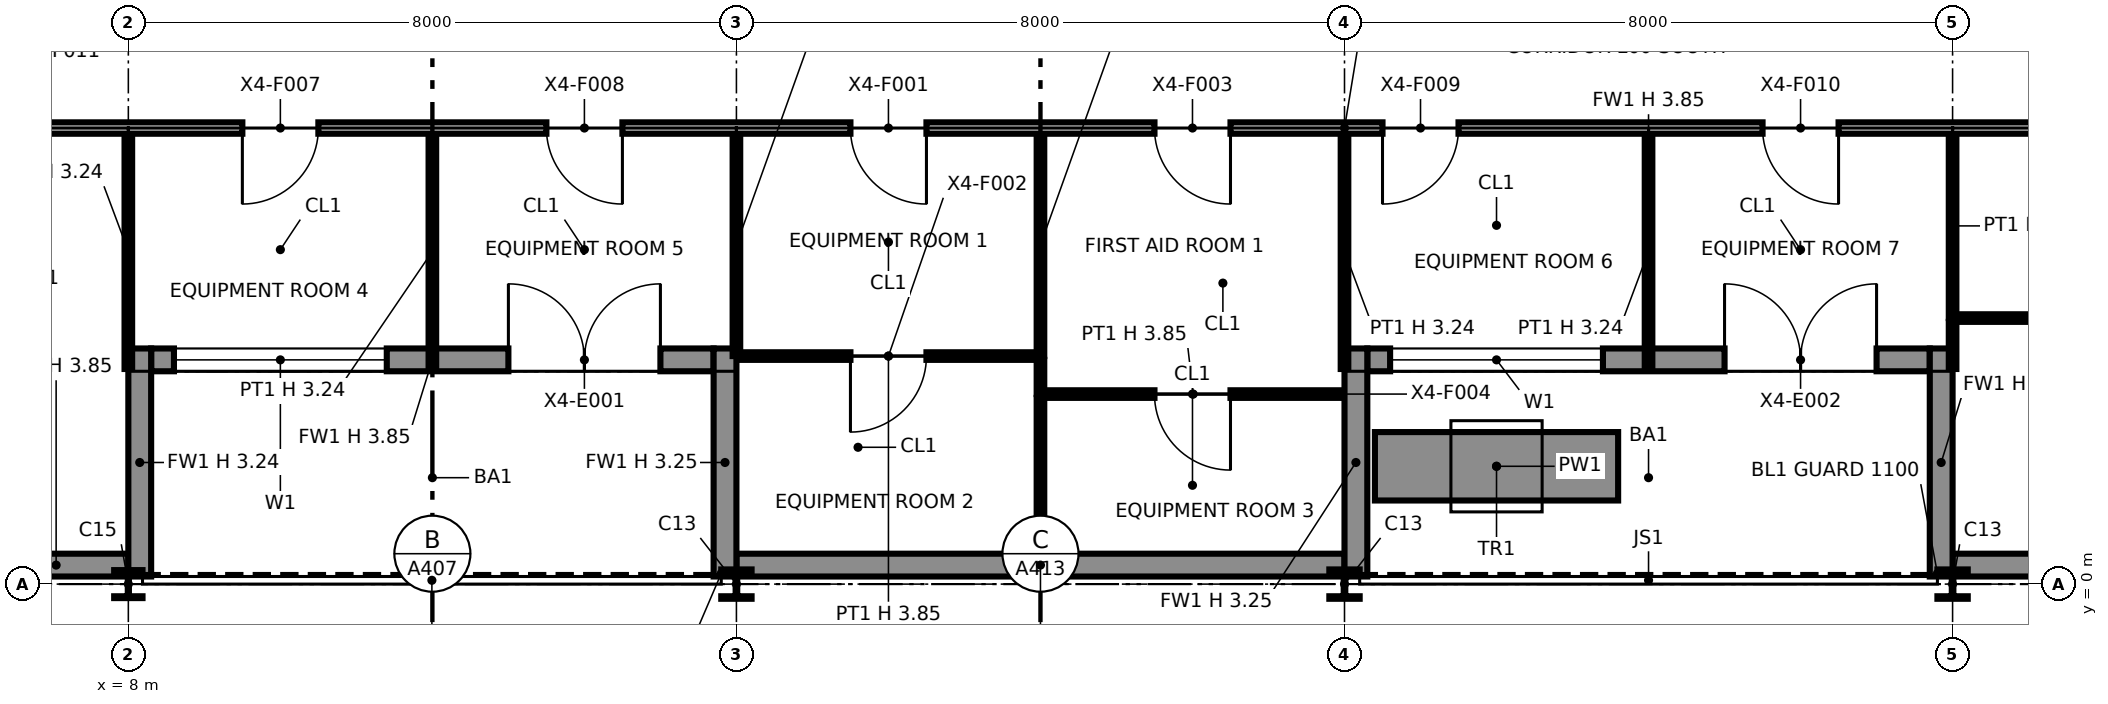
"""IFC4 building model, lengths in metres.
Left out: names, types, materials, properties, quantities, classifications, styles, units other than length and angle.
Written with IfcOpenShell. Run it as: python <this file> out.ifc"""

import sys

from ifc_helpers import new_model, si_unit, direction, frame, frame_2d, origin, origin_2d, place, context, subcontext, project, spatial, rectangle, i_section, extrude, element, fill, save


model = new_model("IFC4")
c1 = context("Model", 3, precision=1e-05, world=origin(), true_north=direction((0.0, 1.0)))
c2 = subcontext(c1, "Body", "Model", "MODEL_VIEW")
j1 = project(units=[si_unit("LENGTHUNIT", "METRE"), si_unit("PLANEANGLEUNIT", "RADIAN")], contexts=[c1])
p1 = place(None, origin())
s1 = spatial("IfcSite", under=j1, at=p1, CompositionType="ELEMENT")
p2 = place(p1, origin())
s2 = spatial("IfcBuilding", under=s1, at=p2, CompositionType="ELEMENT")
p3 = place(p2, frame((0.0, 0.0, 275.0)))
s3 = spatial("IfcBuildingStorey", under=s2, at=p3, CompositionType="ELEMENT", Elevation=275.0)
p4 = place(p3, frame((8.0, 0.0, 0.0), z_axis=(0.0, 0.0, 1.0), x_axis=(1.0, 0.0, 0.0)))
e1 = element("IfcColumn", 1, at=p4, inside=s3, PredefinedType="COLUMN", context=c2, shape_type="SweptSolid", body=[
    extrude(i_section(OverallWidth=0.373, OverallDepth=0.368, WebThickness=0.015, FlangeThickness=0.024, at=origin_2d()), origin(), (0.0, 0.0, 1.0), 3.85),
])
for number, where, z_axis, x_axis in (
    (2, (16.0, 0.0, 0.0), (0.0, 0.0, 1.0), (1.0, 0.0, 0.0)),
    (3, (24.0, 0.0, 0.0), (0.0, 0.0, 1.0), (1.0, 0.0, 0.0)),
    (4, (32.0, 0.0, 0.0), (0.0, 0.0, 1.0), (1.0, 0.0, 0.0)),
):
    element("IfcColumn", number, at=place(p3, frame(where, z_axis=z_axis, x_axis=x_axis)), inside=s3, PredefinedType="COLUMN", context=c2, shape_type="SweptSolid", body=[
        extrude(i_section(OverallWidth=0.399, OverallDepth=0.386, WebThickness=0.021, FlangeThickness=0.033, at=origin_2d()), origin(), (0.0, 0.0, 1.0), 3.85),
    ])
p5 = place(p3, frame((6.1, 0.25, 0.0), z_axis=(0.0, 0.0, 1.0), x_axis=(1.0, 0.0, 0.0)))
e5 = element("IfcWall", 5, at=p5, inside=s3, PredefinedType="SOLIDWALL", context=c2, shape_type="SweptSolid", body=[
    extrude(rectangle(XDim=1.9, YDim=0.3, at=frame_2d((0.95, 0.0))), origin(), (0.0, 0.0, 1.0), 3.85),
])
p6 = place(p3, frame((8.3, 2.95, 0.0), z_axis=(0.0, 0.0, 1.0), x_axis=(1.0, 0.0, 0.0)))
e6 = element("IfcWall", 6, at=p6, inside=s3, PredefinedType="SOLIDWALL", context=c2, shape_type="SweptSolid", body=[
    extrude(rectangle(XDim=7.4, YDim=0.3, at=frame_2d((3.7, 0.0))), origin(), (0.0, 0.0, 1.0), 3.85),
])
p7 = place(p6, frame((0.3, 0.0, 0.9)))
e7 = element("IfcOpeningElement", 7, at=p7, cuts=e6, PredefinedType="OPENING", context=c2, shape_type="SweptSolid", body=[
    extrude(rectangle(XDim=2.8, YDim=2.2, at=frame_2d((1.4, 1.1))), frame((0.0, 0.16, 0.0), z_axis=(0.0, -1.0, 0.0), x_axis=(1.0, 0.0, 0.0)), (0.0, 0.0, 1.0), 0.32),
])
p8 = place(p6, frame((4.7, 0.0, 0.0)))
e8 = element("IfcOpeningElement", 8, at=p8, cuts=e6, PredefinedType="OPENING", context=c2, shape_type="SweptSolid", body=[
    extrude(rectangle(XDim=2.0, YDim=2.4, at=frame_2d((1.0, 1.2))), frame((0.0, 0.16, 0.0), z_axis=(0.0, -1.0, 0.0), x_axis=(1.0, 0.0, 0.0)), (0.0, 0.0, 1.0), 0.32),
])
p9 = place(p3, frame((8.15, 0.1, 0.0), z_axis=(0.0, 0.0, 1.0), x_axis=(0.0, 1.0, 0.0)))
e9 = element("IfcWall", 9, at=p9, inside=s3, PredefinedType="SOLIDWALL", context=c2, shape_type="SweptSolid", body=[
    extrude(rectangle(XDim=3.0, YDim=0.3, at=frame_2d((1.5, 0.0))), origin(), (0.0, 0.0, 1.0), 3.237),
])
p10 = place(p3, frame((15.85, 0.1, 0.0), z_axis=(0.0, 0.0, 1.0), x_axis=(0.0, 1.0, 0.0)))
e10 = element("IfcWall", 10, at=p10, inside=s3, PredefinedType="SOLIDWALL", context=c2, shape_type="SweptSolid", body=[
    extrude(rectangle(XDim=3.0, YDim=0.3, at=frame_2d((1.5, 0.0))), origin(), (0.0, 0.0, 1.0), 3.247),
])
p11 = place(p3, frame((16.0, 0.25, 0.0), z_axis=(0.0, 0.0, 1.0), x_axis=(1.0, 0.0, 0.0)))
e11 = element("IfcWall", 11, at=p11, inside=s3, PredefinedType="SOLIDWALL", context=c2, shape_type="SweptSolid", body=[
    extrude(rectangle(XDim=8.0, YDim=0.3, at=frame_2d((4.0, 0.0))), origin(), (0.0, 0.0, 1.0), 3.85),
])
p12 = place(p3, frame((24.3, 2.95, 0.0), z_axis=(0.0, 0.0, 1.0), x_axis=(1.0, 0.0, 0.0)))
e12 = element("IfcWall", 12, at=p12, inside=s3, PredefinedType="SOLIDWALL", context=c2, shape_type="SweptSolid", body=[
    extrude(rectangle(XDim=7.4, YDim=0.3, at=frame_2d((3.7, 0.0))), origin(), (0.0, 0.0, 1.0), 3.85),
])
p13 = place(p12, frame((0.3, 0.0, 0.9)))
e13 = element("IfcOpeningElement", 13, at=p13, cuts=e12, PredefinedType="OPENING", context=c2, shape_type="SweptSolid", body=[
    extrude(rectangle(XDim=2.8, YDim=2.2, at=frame_2d((1.4, 1.1))), frame((0.0, 0.16, 0.0), z_axis=(0.0, -1.0, 0.0), x_axis=(1.0, 0.0, 0.0)), (0.0, 0.0, 1.0), 0.32),
])
p14 = place(p12, frame((4.7, 0.0, 0.0)))
e14 = element("IfcOpeningElement", 14, at=p14, cuts=e12, PredefinedType="OPENING", context=c2, shape_type="SweptSolid", body=[
    extrude(rectangle(XDim=2.0, YDim=2.4, at=frame_2d((1.0, 1.2))), frame((0.0, 0.16, 0.0), z_axis=(0.0, -1.0, 0.0), x_axis=(1.0, 0.0, 0.0)), (0.0, 0.0, 1.0), 0.32),
])
for number, where, z_axis, x_axis in (
    (15, (24.15, 0.1, 0.0), (0.0, 0.0, 1.0), (0.0, 1.0, 0.0)),
    (16, (31.85, 0.1, 0.0), (0.0, 0.0, 1.0), (0.0, 1.0, 0.0)),
):
    element("IfcWall", number, at=place(p3, frame(where, z_axis=z_axis, x_axis=x_axis)), inside=s3, PredefinedType="SOLIDWALL", context=c2, shape_type="SweptSolid", body=[
        extrude(rectangle(XDim=3.0, YDim=0.3, at=frame_2d((1.5, 0.0))), origin(), (0.0, 0.0, 1.0), 3.247),
    ])
p15 = place(p3, frame((32.0, 0.25, 0.0), z_axis=(0.0, 0.0, 1.0), x_axis=(1.0, 0.0, 0.0)))
e17 = element("IfcWall", 17, at=p15, inside=s3, PredefinedType="SOLIDWALL", context=c2, shape_type="SweptSolid", body=[
    extrude(rectangle(XDim=9.9, YDim=0.3, at=frame_2d((4.95, 0.0))), origin(), (0.0, 0.0, 1.0), 3.85),
])
p16 = place(p3, frame((24.4, 1.55, 0.0), z_axis=(0.0, 0.0, 1.0), x_axis=(1.0, 0.0, 0.0)))
e18 = element("IfcWall", 18, at=p16, inside=s3, PredefinedType="SOLIDWALL", context=c2, shape_type="SweptSolid", body=[
    extrude(rectangle(XDim=3.2, YDim=0.9, at=frame_2d((1.6, 0.0))), origin(), (0.0, 0.0, 1.0), 0.6),
])
p17 = place(p3, frame((20.0, 0.13, 0.0), z_axis=(0.0, 0.0, 1.0), x_axis=(0.0, 1.0, 0.0)))
e19 = element("IfcWall", 19, at=p17, inside=s3, PredefinedType="PARTITIONING", context=c2, shape_type="SweptSolid", body=[
    extrude(rectangle(XDim=2.32, YDim=0.1, at=frame_2d((1.16, 0.0))), origin(), (0.0, 0.0, 1.0), 3.85),
])
p18 = place(p3, frame((20.05, 2.5, 0.0), z_axis=(0.0, 0.0, 1.0), x_axis=(1.0, 0.0, 0.0)))
e20 = element("IfcWall", 20, at=p18, inside=s3, PredefinedType="PARTITIONING", context=c2, shape_type="SweptSolid", body=[
    extrude(rectangle(XDim=3.92, YDim=0.1, at=frame_2d((1.96, 0.0))), origin(), (0.0, 0.0, 1.0), 3.85),
])
p19 = place(p18, frame((2.45, 0.0, 0.0), z_axis=(0.0, 0.0, 1.0), x_axis=(-1.0, 0.0, 0.0)))
e21 = element("IfcOpeningElement", 21, at=p19, cuts=e20, PredefinedType="OPENING", context=c2, shape_type="SweptSolid", body=[
    extrude(rectangle(XDim=1.0, YDim=2.1, at=frame_2d((0.5, 1.05))), frame((0.0, 0.06, 0.0), z_axis=(0.0, -1.0, 0.0), x_axis=(1.0, 0.0, 0.0)), (0.0, 0.0, 1.0), 0.12),
])
p20 = place(p3, frame((20.0, 2.5, 0.0), z_axis=(0.0, 0.0, 1.0), x_axis=(0.0, 1.0, 0.0)))
e22 = element("IfcWall", 22, at=p20, inside=s3, PredefinedType="PARTITIONING", context=c2, shape_type="SweptSolid", body=[
    extrude(rectangle(XDim=0.45, YDim=0.1, at=frame_2d((0.225, 0.0))), origin(), (0.0, 0.0, 1.0), 3.85),
])
for number, where, z_axis, x_axis in (
    (23, (8.0, 2.83, 0.0), (0.0, 0.0, 1.0), (0.0, 1.0, 0.0)),
    (24, (12.0, 2.83, 0.0), (0.0, 0.0, 1.0), (0.0, 1.0, 0.0)),
    (25, (24.0, 2.83, 0.0), (0.0, 0.0, 1.0), (0.0, 1.0, 0.0)),
    (26, (28.0, 2.83, 0.0), (0.0, 0.0, 1.0), (0.0, 1.0, 0.0)),
):
    element("IfcWall", number, at=place(p3, frame(where, z_axis=z_axis, x_axis=x_axis)), inside=s3, PredefinedType="PARTITIONING", context=c2, shape_type="SweptSolid", body=[
        extrude(rectangle(XDim=3.095, YDim=0.1, at=frame_2d((1.547, 0.0))), origin(), (0.0, 0.0, 1.0), 3.238),
    ])
p21 = place(p3, frame((32.0, 2.83, 0.0), z_axis=(0.0, 0.0, 1.0), x_axis=(0.0, 1.0, 0.0)))
e27 = element("IfcWall", 27, at=p21, inside=s3, PredefinedType="PARTITIONING", context=c2, shape_type="SweptSolid", body=[
    extrude(rectangle(XDim=0.62, YDim=0.1, at=frame_2d((0.31, 0.0))), origin(), (0.0, 0.0, 1.0), 3.238),
])
p22 = place(p3, frame((16.05, 3.0, 0.0), z_axis=(0.0, 0.0, 1.0), x_axis=(1.0, 0.0, 0.0)))
e28 = element("IfcWall", 28, at=p22, inside=s3, PredefinedType="PARTITIONING", context=c2, shape_type="SweptSolid", body=[
    extrude(rectangle(XDim=3.9, YDim=0.1, at=frame_2d((1.95, 0.0))), origin(), (0.0, 0.0, 1.0), 3.85),
])
p23 = place(p22, frame((2.45, 0.0, 0.0), z_axis=(0.0, 0.0, 1.0), x_axis=(-1.0, 0.0, 0.0)))
e29 = element("IfcOpeningElement", 29, at=p23, cuts=e28, PredefinedType="OPENING", context=c2, shape_type="SweptSolid", body=[
    extrude(rectangle(XDim=1.0, YDim=2.1, at=frame_2d((0.5, 1.05))), frame((0.0, 0.06, 0.0), z_axis=(0.0, -1.0, 0.0), x_axis=(1.0, 0.0, 0.0)), (0.0, 0.0, 1.0), 0.12),
])
for number, where, z_axis, x_axis in (
    (30, (16.0, 3.0, 0.0), (0.0, 0.0, 1.0), (0.0, 1.0, 0.0)),
    (31, (20.0, 3.0, 0.0), (0.0, 0.0, 1.0), (0.0, 1.0, 0.0)),
):
    element("IfcWall", number, at=place(p3, frame(where, z_axis=z_axis, x_axis=x_axis)), inside=s3, PredefinedType="PARTITIONING", context=c2, shape_type="SweptSolid", body=[
        extrude(rectangle(XDim=2.925, YDim=0.1, at=frame_2d((1.462, 0.0))), origin(), (0.0, 0.0, 1.0), 3.238),
    ])
p24 = place(p3, frame((32.05, 3.5, 0.0), z_axis=(0.0, 0.0, 1.0), x_axis=(1.0, 0.0, 0.0)))
e32 = element("IfcWall", 32, at=p24, inside=s3, PredefinedType="PARTITIONING", context=c2, shape_type="SweptSolid", body=[
    extrude(rectangle(XDim=11.52, YDim=0.1, at=frame_2d((5.76, 0.0))), origin(), (0.0, 0.0, 1.0), 3.85),
])
p25 = place(p24, frame((5.4, 0.0, 0.0)))
e33 = element("IfcOpeningElement", 33, at=p25, cuts=e32, PredefinedType="OPENING", context=c2, shape_type="SweptSolid", body=[
    extrude(rectangle(XDim=1.0, YDim=2.1, at=frame_2d((0.5, 1.05))), frame((0.0, 0.06, 0.0), z_axis=(0.0, -1.0, 0.0), x_axis=(1.0, 0.0, 0.0)), (0.0, 0.0, 1.0), 0.12),
])
p26 = place(p3, frame((32.0, 3.5, 0.0), z_axis=(0.0, 0.0, 1.0), x_axis=(0.0, 1.0, 0.0)))
e34 = element("IfcWall", 34, at=p26, inside=s3, PredefinedType="PARTITIONING", context=c2, shape_type="SweptSolid", body=[
    extrude(rectangle(XDim=2.425, YDim=0.1, at=frame_2d((1.212, 0.0))), origin(), (0.0, 0.0, 1.0), 3.238),
])
p27 = place(p3, frame((6.075, 6.0, 0.0), z_axis=(0.0, 0.0, 1.0), x_axis=(1.0, 0.0, 0.0)))
e35 = element("IfcWall", 35, at=p27, inside=s3, PredefinedType="PARTITIONING", context=c2, shape_type="SweptSolid", body=[
    extrude(rectangle(XDim=35.85, YDim=0.15, at=frame_2d((17.925, 0.0))), origin(), (0.0, 0.0, 1.0), 3.85),
])
p28 = place(p27, frame((12.425, 0.0, 0.0), z_axis=(0.0, 0.0, 1.0), x_axis=(-1.0, 0.0, 0.0)))
e36 = element("IfcOpeningElement", 36, at=p28, cuts=e35, PredefinedType="OPENING", context=c2, shape_type="SweptSolid", body=[
    extrude(rectangle(XDim=1.0, YDim=2.1, at=frame_2d((0.5, 1.05))), frame((0.0, 0.085, 0.0), z_axis=(0.0, -1.0, 0.0), x_axis=(1.0, 0.0, 0.0)), (0.0, 0.0, 1.0), 0.17),
])
p29 = place(p27, frame((16.425, 0.0, 0.0), z_axis=(0.0, 0.0, 1.0), x_axis=(-1.0, 0.0, 0.0)))
e37 = element("IfcOpeningElement", 37, at=p29, cuts=e35, PredefinedType="OPENING", context=c2, shape_type="SweptSolid", body=[
    extrude(rectangle(XDim=1.0, YDim=2.1, at=frame_2d((0.5, 1.05))), frame((0.0, 0.085, 0.0), z_axis=(0.0, -1.0, 0.0), x_axis=(1.0, 0.0, 0.0)), (0.0, 0.0, 1.0), 0.17),
])
p30 = place(p27, frame((30.425, 0.0, 0.0), z_axis=(0.0, 0.0, 1.0), x_axis=(-1.0, 0.0, 0.0)))
e38 = element("IfcOpeningElement", 38, at=p30, cuts=e35, PredefinedType="OPENING", context=c2, shape_type="SweptSolid", body=[
    extrude(rectangle(XDim=1.0, YDim=2.1, at=frame_2d((0.5, 1.05))), frame((0.0, 0.085, 0.0), z_axis=(0.0, -1.0, 0.0), x_axis=(1.0, 0.0, 0.0)), (0.0, 0.0, 1.0), 0.17),
])
p31 = place(p27, frame((4.425, 0.0, 0.0), z_axis=(0.0, 0.0, 1.0), x_axis=(-1.0, 0.0, 0.0)))
e39 = element("IfcOpeningElement", 39, at=p31, cuts=e35, PredefinedType="OPENING", context=c2, shape_type="SweptSolid", body=[
    extrude(rectangle(XDim=1.0, YDim=2.1, at=frame_2d((0.5, 1.05))), frame((0.0, 0.085, 0.0), z_axis=(0.0, -1.0, 0.0), x_axis=(1.0, 0.0, 0.0)), (0.0, 0.0, 1.0), 0.17),
])
p32 = place(p27, frame((8.425, 0.0, 0.0), z_axis=(0.0, 0.0, 1.0), x_axis=(-1.0, 0.0, 0.0)))
e40 = element("IfcOpeningElement", 40, at=p32, cuts=e35, PredefinedType="OPENING", context=c2, shape_type="SweptSolid", body=[
    extrude(rectangle(XDim=1.0, YDim=2.1, at=frame_2d((0.5, 1.05))), frame((0.0, 0.085, 0.0), z_axis=(0.0, -1.0, 0.0), x_axis=(1.0, 0.0, 0.0)), (0.0, 0.0, 1.0), 0.17),
])
p33 = place(p27, frame((19.425, 0.0, 0.0), z_axis=(0.0, 0.0, 1.0), x_axis=(-1.0, 0.0, 0.0)))
e41 = element("IfcOpeningElement", 41, at=p33, cuts=e35, PredefinedType="OPENING", context=c2, shape_type="SweptSolid", body=[
    extrude(rectangle(XDim=1.0, YDim=2.1, at=frame_2d((0.5, 1.05))), frame((0.0, 0.085, 0.0), z_axis=(0.0, -1.0, 0.0), x_axis=(1.0, 0.0, 0.0)), (0.0, 0.0, 1.0), 0.17),
])
p34 = place(p27, frame((24.425, 0.0, 0.0), z_axis=(0.0, 0.0, 1.0), x_axis=(-1.0, 0.0, 0.0)))
e42 = element("IfcOpeningElement", 42, at=p34, cuts=e35, PredefinedType="OPENING", context=c2, shape_type="SweptSolid", body=[
    extrude(rectangle(XDim=1.0, YDim=2.1, at=frame_2d((0.5, 1.05))), frame((0.0, 0.085, 0.0), z_axis=(0.0, -1.0, 0.0), x_axis=(1.0, 0.0, 0.0)), (0.0, 0.0, 1.0), 0.17),
])
p35 = place(p7, origin())
e43 = element("IfcWindow", 43, at=p35, inside=s3, PartitioningType="SINGLE_PANEL", PredefinedType="WINDOW", context=c2, shape_type="SweptSolid", body=[
    extrude(rectangle(XDim=2.8, YDim=2.2, at=frame_2d((1.4, 1.1))), frame((0.0, 0.03, 0.0), z_axis=(0.0, -1.0, 0.0), x_axis=(1.0, 0.0, 0.0)), (0.0, 0.0, 1.0), 0.06),
])
fill(e7, e43)
p36 = place(p8, origin())
e44 = element("IfcDoor", 44, at=p36, inside=s3, OperationType="DOUBLE_DOOR_SINGLE_SWING", PredefinedType="DOOR", context=c2, shape_type="SweptSolid", body=[
    extrude(rectangle(XDim=2.0, YDim=2.4, at=frame_2d((1.0, 1.2))), frame((0.0, 0.025, 0.0), z_axis=(0.0, -1.0, 0.0), x_axis=(1.0, 0.0, 0.0)), (0.0, 0.0, 1.0), 0.05),
])
fill(e8, e44)
p37 = place(p13, origin())
e45 = element("IfcWindow", 45, at=p37, inside=s3, PartitioningType="SINGLE_PANEL", PredefinedType="WINDOW", context=c2, shape_type="SweptSolid", body=[
    extrude(rectangle(XDim=2.8, YDim=2.2, at=frame_2d((1.4, 1.1))), frame((0.0, 0.03, 0.0), z_axis=(0.0, -1.0, 0.0), x_axis=(1.0, 0.0, 0.0)), (0.0, 0.0, 1.0), 0.06),
])
fill(e13, e45)
p38 = place(p14, origin())
e46 = element("IfcDoor", 46, at=p38, inside=s3, OperationType="DOUBLE_DOOR_SINGLE_SWING", PredefinedType="DOOR", context=c2, shape_type="SweptSolid", body=[
    extrude(rectangle(XDim=2.0, YDim=2.4, at=frame_2d((1.0, 1.2))), frame((0.0, 0.025, 0.0), z_axis=(0.0, -1.0, 0.0), x_axis=(1.0, 0.0, 0.0)), (0.0, 0.0, 1.0), 0.05),
])
fill(e14, e46)
p39 = place(p28, origin())
e47 = element("IfcDoor", 47, at=p39, inside=s3, OperationType="SINGLE_SWING_LEFT", PredefinedType="DOOR", context=c2, shape_type="SweptSolid", body=[
    extrude(rectangle(XDim=1.0, YDim=2.1, at=frame_2d((0.5, 1.05))), frame((0.0, 0.025, 0.0), z_axis=(0.0, -1.0, 0.0), x_axis=(1.0, 0.0, 0.0)), (0.0, 0.0, 1.0), 0.05),
])
fill(e36, e47)
p40 = place(p23, origin())
e48 = element("IfcDoor", 48, at=p40, inside=s3, OperationType="SINGLE_SWING_RIGHT", PredefinedType="DOOR", context=c2, shape_type="SweptSolid", body=[
    extrude(rectangle(XDim=1.0, YDim=2.1, at=frame_2d((0.5, 1.05))), frame((0.0, 0.025, 0.0), z_axis=(0.0, -1.0, 0.0), x_axis=(1.0, 0.0, 0.0)), (0.0, 0.0, 1.0), 0.05),
])
fill(e29, e48)
p41 = place(p29, origin())
e49 = element("IfcDoor", 49, at=p41, inside=s3, OperationType="SINGLE_SWING_LEFT", PredefinedType="DOOR", context=c2, shape_type="SweptSolid", body=[
    extrude(rectangle(XDim=1.0, YDim=2.1, at=frame_2d((0.5, 1.05))), frame((0.0, 0.025, 0.0), z_axis=(0.0, -1.0, 0.0), x_axis=(1.0, 0.0, 0.0)), (0.0, 0.0, 1.0), 0.05),
])
fill(e37, e49)
p42 = place(p19, origin())
e50 = element("IfcDoor", 50, at=p42, inside=s3, OperationType="SINGLE_SWING_LEFT", PredefinedType="DOOR", context=c2, shape_type="SweptSolid", body=[
    extrude(rectangle(XDim=1.0, YDim=2.1, at=frame_2d((0.5, 1.05))), frame((0.0, 0.025, 0.0), z_axis=(0.0, -1.0, 0.0), x_axis=(1.0, 0.0, 0.0)), (0.0, 0.0, 1.0), 0.05),
])
fill(e21, e50)
p43 = place(p31, origin())
e51 = element("IfcDoor", 51, at=p43, inside=s3, OperationType="SINGLE_SWING_RIGHT", PredefinedType="DOOR", context=c2, shape_type="SweptSolid", body=[
    extrude(rectangle(XDim=1.0, YDim=2.1, at=frame_2d((0.5, 1.05))), frame((0.0, 0.025, 0.0), z_axis=(0.0, -1.0, 0.0), x_axis=(1.0, 0.0, 0.0)), (0.0, 0.0, 1.0), 0.05),
])
fill(e39, e51)
p44 = place(p32, origin())
e52 = element("IfcDoor", 52, at=p44, inside=s3, OperationType="SINGLE_SWING_LEFT", PredefinedType="DOOR", context=c2, shape_type="SweptSolid", body=[
    extrude(rectangle(XDim=1.0, YDim=2.1, at=frame_2d((0.5, 1.05))), frame((0.0, 0.025, 0.0), z_axis=(0.0, -1.0, 0.0), x_axis=(1.0, 0.0, 0.0)), (0.0, 0.0, 1.0), 0.05),
])
fill(e40, e52)
p45 = place(p33, origin())
e53 = element("IfcDoor", 53, at=p45, inside=s3, OperationType="SINGLE_SWING_RIGHT", PredefinedType="DOOR", context=c2, shape_type="SweptSolid", body=[
    extrude(rectangle(XDim=1.0, YDim=2.1, at=frame_2d((0.5, 1.05))), frame((0.0, 0.025, 0.0), z_axis=(0.0, -1.0, 0.0), x_axis=(1.0, 0.0, 0.0)), (0.0, 0.0, 1.0), 0.05),
])
fill(e41, e53)
p46 = place(p34, origin())
e54 = element("IfcDoor", 54, at=p46, inside=s3, OperationType="SINGLE_SWING_LEFT", PredefinedType="DOOR", context=c2, shape_type="SweptSolid", body=[
    extrude(rectangle(XDim=1.0, YDim=2.1, at=frame_2d((0.5, 1.05))), frame((0.0, 0.025, 0.0), z_axis=(0.0, -1.0, 0.0), x_axis=(1.0, 0.0, 0.0)), (0.0, 0.0, 1.0), 0.05),
])
fill(e42, e54)
save(model, sys.argv[1])
